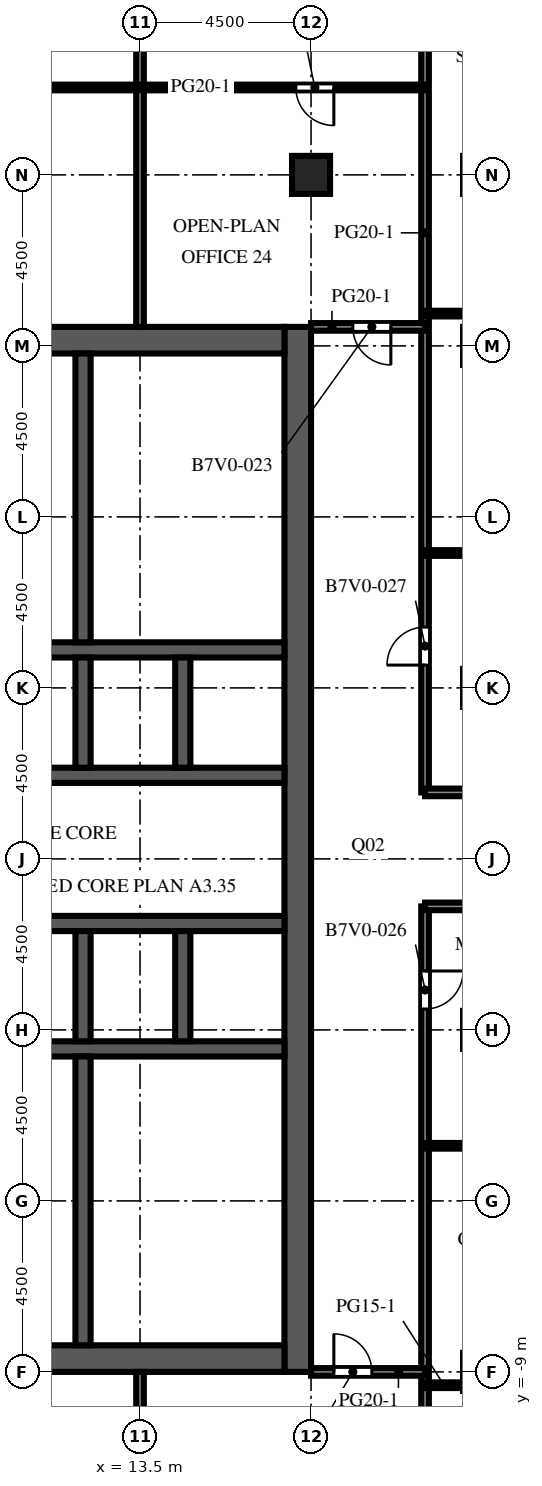
"""IFC4 building model, lengths in metres.
Left out: names, types, materials, properties, quantities, classifications, styles, units other than length and angle.
Written with IfcOpenShell. Run it as: python <this file> out.ifc"""

import sys

from ifc_helpers import new_model, si_unit, direction, frame, frame_2d, origin, origin_2d, place, context, subcontext, project, spatial, rectangle, extrude, element, fill, save


model = new_model("IFC4")
c1 = context("Model", 3, precision=1e-05, world=origin(), true_north=direction((0.0, 1.0)))
c2 = subcontext(c1, "Body", "Model", "MODEL_VIEW")
j1 = project(units=[si_unit("LENGTHUNIT", "METRE"), si_unit("PLANEANGLEUNIT", "RADIAN")], contexts=[c1])
p1 = place(None, origin())
s1 = spatial("IfcSite", under=j1, at=p1, CompositionType="ELEMENT")
p2 = place(p1, origin())
s2 = spatial("IfcBuilding", under=s1, at=p2, CompositionType="ELEMENT")
p3 = place(p2, frame((0.0, 0.0, 239.8)))
s3 = spatial("IfcBuildingStorey", under=s2, at=p3, CompositionType="ELEMENT", Elevation=239.8)
p4 = place(p3, frame((18.0, 22.5, 0.0), z_axis=(0.0, 0.0, 1.0), x_axis=(1.0, 0.0, 0.0)))
e1 = element("IfcColumn", 1, at=p4, inside=s3, PredefinedType="COLUMN", context=c2, shape_type="SweptSolid", body=[
    extrude(rectangle(XDim=1.0, YDim=1.0, at=origin_2d()), origin(), (0.0, 0.0, 1.0), 4.1),
])
p5 = place(p3, frame((17.65, -9.0, 0.0), z_axis=(0.0, 0.0, 1.0), x_axis=(0.0, 1.0, 0.0)))
e2 = element("IfcWall", 2, at=p5, inside=s3, PredefinedType="SHEAR", context=c2, shape_type="SweptSolid", body=[
    extrude(rectangle(XDim=27.5, YDim=0.7, at=frame_2d((13.75, 0.0))), origin(), (0.0, 0.0, 1.0), 4.1),
])
p6 = place(p5, frame((12.55, 0.0, 0.0)))
e3 = element("IfcOpeningElement", 3, at=p6, cuts=e2, PredefinedType="OPENING", context=c2, shape_type="SweptSolid", body=[
    extrude(rectangle(XDim=2.4, YDim=2.4, at=frame_2d((1.2, 1.2))), frame((0.0, 0.36, 0.0), z_axis=(0.0, -1.0, 0.0), x_axis=(1.0, 0.0, 0.0)), (0.0, 0.0, 1.0), 0.72),
])
p7 = place(p5, frame((6.825, 0.0, 0.0)))
e4 = element("IfcOpeningElement", 4, at=p7, cuts=e2, PredefinedType="OPENING", context=c2, shape_type="SweptSolid", body=[
    extrude(rectangle(XDim=1.2, YDim=2.1, at=frame_2d((0.6, 1.05))), frame((0.0, 0.36, 0.0), z_axis=(0.0, -1.0, 0.0), x_axis=(1.0, 0.0, 0.0)), (0.0, 0.0, 1.0), 0.72),
])
p8 = place(p5, frame((19.475, 0.0, 0.0)))
e5 = element("IfcOpeningElement", 5, at=p8, cuts=e2, PredefinedType="OPENING", context=c2, shape_type="SweptSolid", body=[
    extrude(rectangle(XDim=1.2, YDim=2.1, at=frame_2d((0.6, 1.05))), frame((0.0, 0.36, 0.0), z_axis=(0.0, -1.0, 0.0), x_axis=(1.0, 0.0, 0.0)), (0.0, 0.0, 1.0), 0.72),
])
for number, where, z_axis, x_axis in (
    (6, (6.7, -8.65, 0.0), (0.0, 0.0, 1.0), (1.0, 0.0, 0.0)),
    (7, (6.7, 18.15, 0.0), (0.0, 0.0, 1.0), (1.0, 0.0, 0.0)),
):
    element("IfcWall", number, at=place(p3, frame(where, z_axis=z_axis, x_axis=x_axis)), inside=s3, PredefinedType="SHEAR", context=c2, shape_type="SweptSolid", body=[
        extrude(rectangle(XDim=10.6, YDim=0.7, at=frame_2d((5.3, 0.0))), origin(), (0.0, 0.0, 1.0), 4.1),
    ])
p9 = place(p3, frame((6.7, -0.5, 0.0), z_axis=(0.0, 0.0, 1.0), x_axis=(1.0, 0.0, 0.0)))
e8 = element("IfcWall", 8, at=p9, inside=s3, PredefinedType="SHEAR", context=c2, shape_type="SweptSolid", body=[
    extrude(rectangle(XDim=10.6, YDim=0.4, at=frame_2d((5.3, 0.0))), origin(), (0.0, 0.0, 1.0), 4.1),
])
p10 = place(p3, frame((6.7, 2.8, 0.0), z_axis=(0.0, 0.0, 1.0), x_axis=(1.0, 0.0, 0.0)))
e9 = element("IfcWall", 9, at=p10, inside=s3, PredefinedType="SHEAR", context=c2, shape_type="SweptSolid", body=[
    extrude(rectangle(XDim=10.6, YDim=0.4, at=frame_2d((5.3, 0.0))), origin(), (0.0, 0.0, 1.0), 4.1),
])
p11 = place(p10, frame((0.688, 0.0, 0.0)))
e10 = element("IfcOpeningElement", 10, at=p11, cuts=e9, PredefinedType="OPENING", context=c2, shape_type="SweptSolid", body=[
    extrude(rectangle(XDim=1.1, YDim=2.1, at=frame_2d((0.55, 1.05))), frame((0.0, 0.21, 0.0), z_axis=(0.0, -1.0, 0.0), x_axis=(1.0, 0.0, 0.0)), (0.0, 0.0, 1.0), 0.42),
])
p12 = place(p10, frame((3.438, 0.0, 0.0)))
e11 = element("IfcOpeningElement", 11, at=p12, cuts=e9, PredefinedType="OPENING", context=c2, shape_type="SweptSolid", body=[
    extrude(rectangle(XDim=1.1, YDim=2.1, at=frame_2d((0.55, 1.05))), frame((0.0, 0.21, 0.0), z_axis=(0.0, -1.0, 0.0), x_axis=(1.0, 0.0, 0.0)), (0.0, 0.0, 1.0), 0.42),
])
p13 = place(p10, frame((6.113, 0.0, 0.0)))
e12 = element("IfcOpeningElement", 12, at=p13, cuts=e9, PredefinedType="OPENING", context=c2, shape_type="SweptSolid", body=[
    extrude(rectangle(XDim=1.0, YDim=2.1, at=frame_2d((0.5, 1.05))), frame((0.0, 0.21, 0.0), z_axis=(0.0, -1.0, 0.0), x_axis=(1.0, 0.0, 0.0)), (0.0, 0.0, 1.0), 0.42),
])
p14 = place(p10, frame((8.863, 0.0, 0.0)))
e13 = element("IfcOpeningElement", 13, at=p14, cuts=e9, PredefinedType="OPENING", context=c2, shape_type="SweptSolid", body=[
    extrude(rectangle(XDim=1.0, YDim=2.1, at=frame_2d((0.5, 1.05))), frame((0.0, 0.21, 0.0), z_axis=(0.0, -1.0, 0.0), x_axis=(1.0, 0.0, 0.0)), (0.0, 0.0, 1.0), 0.42),
])
p15 = place(p3, frame((6.7, 6.7, 0.0), z_axis=(0.0, 0.0, 1.0), x_axis=(1.0, 0.0, 0.0)))
e14 = element("IfcWall", 14, at=p15, inside=s3, PredefinedType="SHEAR", context=c2, shape_type="SweptSolid", body=[
    extrude(rectangle(XDim=10.6, YDim=0.4, at=frame_2d((5.3, 0.0))), origin(), (0.0, 0.0, 1.0), 4.1),
])
p16 = place(p15, frame((3.438, 0.0, 0.0)))
e15 = element("IfcOpeningElement", 15, at=p16, cuts=e14, PredefinedType="OPENING", context=c2, shape_type="SweptSolid", body=[
    extrude(rectangle(XDim=1.1, YDim=2.1, at=frame_2d((0.55, 1.05))), frame((0.0, 0.21, 0.0), z_axis=(0.0, -1.0, 0.0), x_axis=(1.0, 0.0, 0.0)), (0.0, 0.0, 1.0), 0.42),
])
p17 = place(p15, frame((6.062, 0.0, 0.0)))
e16 = element("IfcOpeningElement", 16, at=p17, cuts=e14, PredefinedType="OPENING", context=c2, shape_type="SweptSolid", body=[
    extrude(rectangle(XDim=1.1, YDim=2.1, at=frame_2d((0.55, 1.05))), frame((0.0, 0.21, 0.0), z_axis=(0.0, -1.0, 0.0), x_axis=(1.0, 0.0, 0.0)), (0.0, 0.0, 1.0), 0.42),
])
p18 = place(p15, frame((8.812, 0.0, 0.0)))
e17 = element("IfcOpeningElement", 17, at=p18, cuts=e14, PredefinedType="OPENING", context=c2, shape_type="SweptSolid", body=[
    extrude(rectangle(XDim=1.1, YDim=2.1, at=frame_2d((0.55, 1.05))), frame((0.0, 0.21, 0.0), z_axis=(0.0, -1.0, 0.0), x_axis=(1.0, 0.0, 0.0)), (0.0, 0.0, 1.0), 0.42),
])
p19 = place(p15, frame((0.738, 0.0, 0.0)))
e18 = element("IfcOpeningElement", 18, at=p19, cuts=e14, PredefinedType="OPENING", context=c2, shape_type="SweptSolid", body=[
    extrude(rectangle(XDim=1.0, YDim=2.1, at=frame_2d((0.5, 1.05))), frame((0.0, 0.21, 0.0), z_axis=(0.0, -1.0, 0.0), x_axis=(1.0, 0.0, 0.0)), (0.0, 0.0, 1.0), 0.42),
])
p20 = place(p3, frame((6.7, 10.0, 0.0), z_axis=(0.0, 0.0, 1.0), x_axis=(1.0, 0.0, 0.0)))
e19 = element("IfcWall", 19, at=p20, inside=s3, PredefinedType="SHEAR", context=c2, shape_type="SweptSolid", body=[
    extrude(rectangle(XDim=10.6, YDim=0.4, at=frame_2d((5.3, 0.0))), origin(), (0.0, 0.0, 1.0), 4.1),
])
for number, where, z_axis, x_axis in (
    (20, (12.0, -0.3, 0.0), (0.0, 0.0, 1.0), (0.0, 1.0, 0.0)),
    (21, (12.0, 6.9, 0.0), (0.0, 0.0, 1.0), (0.0, 1.0, 0.0)),
    (22, (14.625, -0.3, 0.0), (0.0, 0.0, 1.0), (0.0, 1.0, 0.0)),
    (23, (14.625, 6.9, 0.0), (0.0, 0.0, 1.0), (0.0, 1.0, 0.0)),
):
    element("IfcWall", number, at=place(p3, frame(where, z_axis=z_axis, x_axis=x_axis)), inside=s3, PredefinedType="SHEAR", context=c2, shape_type="SweptSolid", body=[
        extrude(rectangle(XDim=2.9, YDim=0.4, at=frame_2d((1.45, 0.0))), origin(), (0.0, 0.0, 1.0), 4.1),
    ])
for number, where, z_axis, x_axis in (
    (24, (12.0, -8.3, 0.0), (0.0, 0.0, 1.0), (0.0, 1.0, 0.0)),
    (25, (12.0, 10.2, 0.0), (0.0, 0.0, 1.0), (0.0, 1.0, 0.0)),
):
    element("IfcWall", number, at=place(p3, frame(where, z_axis=z_axis, x_axis=x_axis)), inside=s3, PredefinedType="SHEAR", context=c2, shape_type="SweptSolid", body=[
        extrude(rectangle(XDim=7.6, YDim=0.4, at=frame_2d((3.8, 0.0))), origin(), (0.0, 0.0, 1.0), 4.1),
    ])
for number, where, z_axis, x_axis in (
    (26, (8.2, -5.26, 0.0), (0.0, 0.0, 1.0), (1.0, 0.0, 0.0)),
    (27, (8.2, -2.98, 0.0), (0.0, 0.0, 1.0), (1.0, 0.0, 0.0)),
):
    element("IfcWall", number, at=place(p3, frame(where, z_axis=z_axis, x_axis=x_axis)), inside=s3, PredefinedType="PARTITIONING", context=c2, shape_type="SweptSolid", body=[
        extrude(rectangle(XDim=3.6, YDim=0.1, at=frame_2d((1.8, 0.0))), origin(), (0.0, 0.0, 1.0), 3.65),
    ])
for number, where, z_axis, x_axis in (
    (28, (6.7, 11.72, 0.0), (0.0, 0.0, 1.0), (1.0, 0.0, 0.0)),
    (29, (6.7, 13.62, 0.0), (0.0, 0.0, 1.0), (1.0, 0.0, 0.0)),
    (30, (6.7, 15.9, 0.0), (0.0, 0.0, 1.0), (1.0, 0.0, 0.0)),
):
    element("IfcWall", number, at=place(p3, frame(where, z_axis=z_axis, x_axis=x_axis)), inside=s3, PredefinedType="PARTITIONING", context=c2, shape_type="SweptSolid", body=[
        extrude(rectangle(XDim=5.1, YDim=0.1, at=frame_2d((2.55, 0.0))), origin(), (0.0, 0.0, 1.0), 3.65),
    ])
p21 = place(p3, frame((13.5, -22.1, 0.0), z_axis=(0.0, 0.0, 1.0), x_axis=(0.0, 1.0, 0.0)))
e31 = element("IfcWall", 31, at=p21, inside=s3, PredefinedType="PARTITIONING", context=c2, shape_type="SweptSolid", body=[
    extrude(rectangle(XDim=13.1, YDim=0.2, at=frame_2d((6.55, 0.0))), origin(), (0.0, 0.0, 1.0), 3.65),
])
p22 = place(p3, frame((13.5, 18.5, 0.0), z_axis=(0.0, 0.0, 1.0), x_axis=(0.0, 1.0, 0.0)))
e32 = element("IfcWall", 32, at=p22, inside=s3, PredefinedType="PARTITIONING", context=c2, shape_type="SweptSolid", body=[
    extrude(rectangle(XDim=12.6, YDim=0.2, at=frame_2d((6.3, 0.0))), origin(), (0.0, 0.0, 1.0), 3.65),
])
p23 = place(p3, frame((21.0, 3.25, 0.0), z_axis=(0.0, 0.0, 1.0), x_axis=(0.0, -1.0, 0.0)))
e33 = element("IfcWall", 33, at=p23, inside=s3, PredefinedType="PARTITIONING", context=c2, shape_type="SweptSolid", body=[
    extrude(rectangle(XDim=25.6, YDim=0.2, at=frame_2d((12.8, 0.0))), origin(), (0.0, 0.0, 1.0), 3.65),
])
p24 = place(p23, frame((1.7, 0.0, 0.0)))
e34 = element("IfcOpeningElement", 34, at=p24, cuts=e33, PredefinedType="OPENING", context=c2, shape_type="SweptSolid", body=[
    extrude(rectangle(XDim=1.0, YDim=2.1, at=frame_2d((0.5, 1.05))), frame((0.0, 0.11, 0.0), z_axis=(0.0, -1.0, 0.0), x_axis=(1.0, 0.0, 0.0)), (0.0, 0.0, 1.0), 0.22),
])
p25 = place(p3, frame((21.0, 31.35, 0.0), z_axis=(0.0, 0.0, 1.0), x_axis=(0.0, -1.0, 0.0)))
e35 = element("IfcWall", 35, at=p25, inside=s3, PredefinedType="PARTITIONING", context=c2, shape_type="SweptSolid", body=[
    extrude(rectangle(XDim=25.1, YDim=0.2, at=frame_2d((12.55, 0.0))), origin(), (0.0, 0.0, 1.0), 3.65),
])
p26 = place(p25, frame((20.75, 0.0, 0.0)))
e36 = element("IfcOpeningElement", 36, at=p26, cuts=e35, PredefinedType="OPENING", context=c2, shape_type="SweptSolid", body=[
    extrude(rectangle(XDim=1.0, YDim=2.1, at=frame_2d((0.5, 1.05))), frame((0.0, 0.11, 0.0), z_axis=(0.0, -1.0, 0.0), x_axis=(1.0, 0.0, 0.0)), (0.0, 0.0, 1.0), 0.22),
])
p27 = place(p3, frame((21.0, -9.35, 0.0), z_axis=(0.0, 0.0, 1.0), x_axis=(1.0, 0.0, 0.0)))
e37 = element("IfcWall", 37, at=p27, inside=s3, PredefinedType="PARTITIONING", context=c2, shape_type="SweptSolid", body=[
    extrude(rectangle(XDim=1.0, YDim=0.15, at=frame_2d((0.5, 0.0))), origin(), (0.0, 0.0, 1.0), 3.65),
])
p28 = place(p3, frame((21.0, -9.0, 0.0), z_axis=(0.0, 0.0, 1.0), x_axis=(-1.0, 0.0, 0.0)))
e38 = element("IfcWall", 38, at=p28, inside=s3, PredefinedType="PARTITIONING", context=c2, shape_type="SweptSolid", body=[
    extrude(rectangle(XDim=3.0, YDim=0.2, at=frame_2d((1.5, 0.0))), origin(), (0.0, 0.0, 1.0), 3.65),
])
p29 = place(p28, frame((1.4, 0.0, 0.0)))
e39 = element("IfcOpeningElement", 39, at=p29, cuts=e38, PredefinedType="OPENING", context=c2, shape_type="SweptSolid", body=[
    extrude(rectangle(XDim=1.0, YDim=2.1, at=frame_2d((0.5, 1.05))), frame((0.0, 0.11, 0.0), z_axis=(0.0, -1.0, 0.0), x_axis=(1.0, 0.0, 0.0)), (0.0, 0.0, 1.0), 0.22),
])
p30 = place(p3, frame((26.85, -3.05, 0.0), z_axis=(0.0, 0.0, 1.0), x_axis=(-1.0, 0.0, 0.0)))
e40 = element("IfcWall", 40, at=p30, inside=s3, PredefinedType="PARTITIONING", context=c2, shape_type="SweptSolid", body=[
    extrude(rectangle(XDim=5.85, YDim=0.15, at=frame_2d((2.925, 0.0))), origin(), (0.0, 0.0, 1.0), 3.65),
])
p31 = place(p30, frame((3.0, 0.0, 0.0)))
e41 = element("IfcOpeningElement", 41, at=p31, cuts=e40, PredefinedType="OPENING", context=c2, shape_type="SweptSolid", body=[
    extrude(rectangle(XDim=1.0, YDim=2.1, at=frame_2d((0.5, 1.05))), frame((0.0, 0.085, 0.0), z_axis=(0.0, -1.0, 0.0), x_axis=(1.0, 0.0, 0.0)), (0.0, 0.0, 1.0), 0.17),
])
for number, where, z_axis, x_axis in (
    (42, (21.0, 3.25, 0.0), (0.0, 0.0, 1.0), (1.0, 0.0, 0.0)),
    (43, (21.0, 6.25, 0.0), (0.0, 0.0, 1.0), (1.0, 0.0, 0.0)),
):
    element("IfcWall", number, at=place(p3, frame(where, z_axis=z_axis, x_axis=x_axis)), inside=s3, PredefinedType="PARTITIONING", context=c2, shape_type="SweptSolid", body=[
        extrude(rectangle(XDim=5.85, YDim=0.2, at=frame_2d((2.925, 0.0))), origin(), (0.0, 0.0, 1.0), 3.65),
    ])
p32 = place(p3, frame((21.0, 12.55, 0.0), z_axis=(0.0, 0.0, 1.0), x_axis=(1.0, 0.0, 0.0)))
e44 = element("IfcWall", 44, at=p32, inside=s3, PredefinedType="PARTITIONING", context=c2, shape_type="SweptSolid", body=[
    extrude(rectangle(XDim=5.85, YDim=0.15, at=frame_2d((2.925, 0.0))), origin(), (0.0, 0.0, 1.0), 3.65),
])
p33 = place(p32, frame((2.6, 0.0, 0.0)))
e45 = element("IfcOpeningElement", 45, at=p33, cuts=e44, PredefinedType="OPENING", context=c2, shape_type="SweptSolid", body=[
    extrude(rectangle(XDim=1.0, YDim=2.1, at=frame_2d((0.5, 1.05))), frame((0.0, 0.085, 0.0), z_axis=(0.0, -1.0, 0.0), x_axis=(1.0, 0.0, 0.0)), (0.0, 0.0, 1.0), 0.17),
])
p34 = place(p3, frame((18.0, 18.5, 0.0), z_axis=(0.0, 0.0, 1.0), x_axis=(1.0, 0.0, 0.0)))
e46 = element("IfcWall", 46, at=p34, inside=s3, PredefinedType="PARTITIONING", context=c2, shape_type="SweptSolid", body=[
    extrude(rectangle(XDim=3.0, YDim=0.2, at=frame_2d((1.5, 0.0))), origin(), (0.0, 0.0, 1.0), 3.65),
])
p35 = place(p34, frame((1.1, 0.0, 0.0)))
e47 = element("IfcOpeningElement", 47, at=p35, cuts=e46, PredefinedType="OPENING", context=c2, shape_type="SweptSolid", body=[
    extrude(rectangle(XDim=1.0, YDim=2.1, at=frame_2d((0.5, 1.05))), frame((0.0, 0.11, 0.0), z_axis=(0.0, -1.0, 0.0), x_axis=(1.0, 0.0, 0.0)), (0.0, 0.0, 1.0), 0.22),
])
p36 = place(p3, frame((21.0, 18.85, 0.0), z_axis=(0.0, 0.0, 1.0), x_axis=(1.0, 0.0, 0.0)))
e48 = element("IfcWall", 48, at=p36, inside=s3, PredefinedType="PARTITIONING", context=c2, shape_type="SweptSolid", body=[
    extrude(rectangle(XDim=5.85, YDim=0.15, at=frame_2d((2.925, 0.0))), origin(), (0.0, 0.0, 1.0), 3.65),
])
p37 = place(p36, frame((3.35, 0.0, 0.0)))
e49 = element("IfcOpeningElement", 49, at=p37, cuts=e48, PredefinedType="OPENING", context=c2, shape_type="SweptSolid", body=[
    extrude(rectangle(XDim=1.0, YDim=2.1, at=frame_2d((0.5, 1.05))), frame((0.0, 0.085, 0.0), z_axis=(0.0, -1.0, 0.0), x_axis=(1.0, 0.0, 0.0)), (0.0, 0.0, 1.0), 0.17),
])
p38 = place(p3, frame((-13.5, 24.8, 0.0), z_axis=(0.0, 0.0, 1.0), x_axis=(1.0, 0.0, 0.0)))
e50 = element("IfcWall", 50, at=p38, inside=s3, PredefinedType="PARTITIONING", context=c2, shape_type="SweptSolid", body=[
    extrude(rectangle(XDim=34.5, YDim=0.15, at=frame_2d((17.25, 0.0))), origin(), (0.0, 0.0, 1.0), 3.65),
])
p39 = place(p38, frame((1.6, 0.0, 0.0)))
e51 = element("IfcOpeningElement", 51, at=p39, cuts=e50, PredefinedType="OPENING", context=c2, shape_type="SweptSolid", body=[
    extrude(rectangle(XDim=1.0, YDim=2.1, at=frame_2d((0.5, 1.05))), frame((0.0, 0.085, 0.0), z_axis=(0.0, -1.0, 0.0), x_axis=(1.0, 0.0, 0.0)), (0.0, 0.0, 1.0), 0.17),
])
p40 = place(p38, frame((10.35, 0.0, 0.0)))
e52 = element("IfcOpeningElement", 52, at=p40, cuts=e50, PredefinedType="OPENING", context=c2, shape_type="SweptSolid", body=[
    extrude(rectangle(XDim=1.0, YDim=2.1, at=frame_2d((0.5, 1.05))), frame((0.0, 0.085, 0.0), z_axis=(0.0, -1.0, 0.0), x_axis=(1.0, 0.0, 0.0)), (0.0, 0.0, 1.0), 0.17),
])
p41 = place(p38, frame((22.35, 0.0, 0.0)))
e53 = element("IfcOpeningElement", 53, at=p41, cuts=e50, PredefinedType="OPENING", context=c2, shape_type="SweptSolid", body=[
    extrude(rectangle(XDim=1.0, YDim=2.1, at=frame_2d((0.5, 1.05))), frame((0.0, 0.085, 0.0), z_axis=(0.0, -1.0, 0.0), x_axis=(1.0, 0.0, 0.0)), (0.0, 0.0, 1.0), 0.17),
])
p42 = place(p38, frame((31.1, 0.0, 0.0)))
e54 = element("IfcOpeningElement", 54, at=p42, cuts=e50, PredefinedType="OPENING", context=c2, shape_type="SweptSolid", body=[
    extrude(rectangle(XDim=1.0, YDim=2.1, at=frame_2d((0.5, 1.05))), frame((0.0, 0.085, 0.0), z_axis=(0.0, -1.0, 0.0), x_axis=(1.0, 0.0, 0.0)), (0.0, 0.0, 1.0), 0.17),
])
p43 = place(p12, origin())
e55 = element("IfcDoor", 55, at=p43, inside=s3, OperationType="DOUBLE_DOOR_SLIDING", PredefinedType="DOOR", context=c2, shape_type="SweptSolid", body=[
    extrude(rectangle(XDim=1.1, YDim=2.1, at=frame_2d((0.55, 1.05))), frame((0.0, 0.025, 0.0), z_axis=(0.0, -1.0, 0.0), x_axis=(1.0, 0.0, 0.0)), (0.0, 0.0, 1.0), 0.05),
])
fill(e11, e55)
p44 = place(p16, origin())
e56 = element("IfcDoor", 56, at=p44, inside=s3, OperationType="DOUBLE_DOOR_SLIDING", PredefinedType="DOOR", context=c2, shape_type="SweptSolid", body=[
    extrude(rectangle(XDim=1.1, YDim=2.1, at=frame_2d((0.55, 1.05))), frame((0.0, 0.025, 0.0), z_axis=(0.0, -1.0, 0.0), x_axis=(1.0, 0.0, 0.0)), (0.0, 0.0, 1.0), 0.05),
])
fill(e15, e56)
p45 = place(p17, origin())
e57 = element("IfcDoor", 57, at=p45, inside=s3, OperationType="DOUBLE_DOOR_SLIDING", PredefinedType="DOOR", context=c2, shape_type="SweptSolid", body=[
    extrude(rectangle(XDim=1.1, YDim=2.1, at=frame_2d((0.55, 1.05))), frame((0.0, 0.025, 0.0), z_axis=(0.0, -1.0, 0.0), x_axis=(1.0, 0.0, 0.0)), (0.0, 0.0, 1.0), 0.05),
])
fill(e16, e57)
p46 = place(p18, origin())
e58 = element("IfcDoor", 58, at=p46, inside=s3, OperationType="DOUBLE_DOOR_SLIDING", PredefinedType="DOOR", context=c2, shape_type="SweptSolid", body=[
    extrude(rectangle(XDim=1.1, YDim=2.1, at=frame_2d((0.55, 1.05))), frame((0.0, 0.025, 0.0), z_axis=(0.0, -1.0, 0.0), x_axis=(1.0, 0.0, 0.0)), (0.0, 0.0, 1.0), 0.05),
])
fill(e17, e58)
p47 = place(p6, origin())
e59 = element("IfcDoor", 59, at=p47, inside=s3, OperationType="DOUBLE_DOOR_DOUBLE_SWING", PredefinedType="DOOR", context=c2, shape_type="SweptSolid", body=[
    extrude(rectangle(XDim=2.4, YDim=2.4, at=frame_2d((1.2, 1.2))), frame((0.0, 0.025, 0.0), z_axis=(0.0, -1.0, 0.0), x_axis=(1.0, 0.0, 0.0)), (0.0, 0.0, 1.0), 0.05),
])
fill(e3, e59)
p48 = place(p7, frame((1.2, 0.0, 0.0), z_axis=(0.0, 0.0, 1.0), x_axis=(-1.0, 0.0, 0.0)))
e60 = element("IfcDoor", 60, at=p48, inside=s3, OperationType="SINGLE_SWING_LEFT", PredefinedType="DOOR", context=c2, shape_type="SweptSolid", body=[
    extrude(rectangle(XDim=1.2, YDim=2.1, at=frame_2d((0.6, 1.05))), frame((0.0, 0.025, 0.0), z_axis=(0.0, -1.0, 0.0), x_axis=(1.0, 0.0, 0.0)), (0.0, 0.0, 1.0), 0.05),
])
fill(e4, e60)
p49 = place(p8, frame((1.2, 0.0, 0.0), z_axis=(0.0, 0.0, 1.0), x_axis=(-1.0, 0.0, 0.0)))
e61 = element("IfcDoor", 61, at=p49, inside=s3, OperationType="SINGLE_SWING_LEFT", PredefinedType="DOOR", context=c2, shape_type="SweptSolid", body=[
    extrude(rectangle(XDim=1.2, YDim=2.1, at=frame_2d((0.6, 1.05))), frame((0.0, 0.025, 0.0), z_axis=(0.0, -1.0, 0.0), x_axis=(1.0, 0.0, 0.0)), (0.0, 0.0, 1.0), 0.05),
])
fill(e5, e61)
p50 = place(p13, origin())
e62 = element("IfcDoor", 62, at=p50, inside=s3, OperationType="SINGLE_SWING_LEFT", PredefinedType="DOOR", context=c2, shape_type="SweptSolid", body=[
    extrude(rectangle(XDim=1.0, YDim=2.1, at=frame_2d((0.5, 1.05))), frame((0.0, 0.025, 0.0), z_axis=(0.0, -1.0, 0.0), x_axis=(1.0, 0.0, 0.0)), (0.0, 0.0, 1.0), 0.05),
])
fill(e12, e62)
p51 = place(p14, origin())
e63 = element("IfcDoor", 63, at=p51, inside=s3, OperationType="SINGLE_SWING_RIGHT", PredefinedType="DOOR", context=c2, shape_type="SweptSolid", body=[
    extrude(rectangle(XDim=1.0, YDim=2.1, at=frame_2d((0.5, 1.05))), frame((0.0, 0.025, 0.0), z_axis=(0.0, -1.0, 0.0), x_axis=(1.0, 0.0, 0.0)), (0.0, 0.0, 1.0), 0.05),
])
fill(e13, e63)
p52 = place(p29, origin())
e64 = element("IfcDoor", 64, at=p52, inside=s3, OperationType="SINGLE_SWING_RIGHT", PredefinedType="DOOR", context=c2, shape_type="SweptSolid", body=[
    extrude(rectangle(XDim=1.0, YDim=2.1, at=frame_2d((0.5, 1.05))), frame((0.0, 0.025, 0.0), z_axis=(0.0, -1.0, 0.0), x_axis=(1.0, 0.0, 0.0)), (0.0, 0.0, 1.0), 0.05),
])
fill(e39, e64)
p53 = place(p35, origin())
e65 = element("IfcDoor", 65, at=p53, inside=s3, OperationType="SINGLE_SWING_RIGHT", PredefinedType="DOOR", context=c2, shape_type="SweptSolid", body=[
    extrude(rectangle(XDim=1.0, YDim=2.1, at=frame_2d((0.5, 1.05))), frame((0.0, 0.025, 0.0), z_axis=(0.0, -1.0, 0.0), x_axis=(1.0, 0.0, 0.0)), (0.0, 0.0, 1.0), 0.05),
])
fill(e47, e65)
p54 = place(p24, origin())
e66 = element("IfcDoor", 66, at=p54, inside=s3, OperationType="SINGLE_SWING_LEFT", PredefinedType="DOOR", context=c2, shape_type="SweptSolid", body=[
    extrude(rectangle(XDim=1.0, YDim=2.1, at=frame_2d((0.5, 1.05))), frame((0.0, 0.025, 0.0), z_axis=(0.0, -1.0, 0.0), x_axis=(1.0, 0.0, 0.0)), (0.0, 0.0, 1.0), 0.05),
])
fill(e34, e66)
p55 = place(p26, origin())
e67 = element("IfcDoor", 67, at=p55, inside=s3, OperationType="SINGLE_SWING_RIGHT", PredefinedType="DOOR", context=c2, shape_type="SweptSolid", body=[
    extrude(rectangle(XDim=1.0, YDim=2.1, at=frame_2d((0.5, 1.05))), frame((0.0, 0.025, 0.0), z_axis=(0.0, -1.0, 0.0), x_axis=(1.0, 0.0, 0.0)), (0.0, 0.0, 1.0), 0.05),
])
fill(e36, e67)
p56 = place(p42, origin())
e68 = element("IfcDoor", 68, at=p56, inside=s3, OperationType="SINGLE_SWING_RIGHT", PredefinedType="DOOR", context=c2, shape_type="SweptSolid", body=[
    extrude(rectangle(XDim=1.0, YDim=2.1, at=frame_2d((0.5, 1.05))), frame((0.0, 0.025, 0.0), z_axis=(0.0, -1.0, 0.0), x_axis=(1.0, 0.0, 0.0)), (0.0, 0.0, 1.0), 0.05),
])
fill(e54, e68)
save(model, sys.argv[1])
